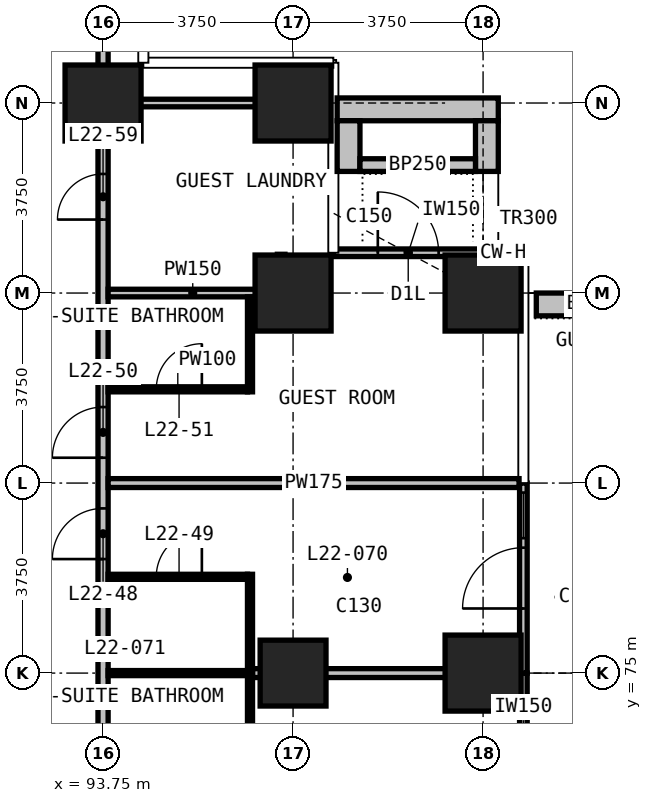
"""IFC4 building model, lengths in metres.
Left out: names, types, materials, properties, quantities, classifications, styles, units other than length and angle.
Written with IfcOpenShell. Run it as: python <this file> out.ifc"""

import sys

from ifc_helpers import new_model, si_unit, direction, frame, frame_2d, origin, origin_2d, place, context, subcontext, project, spatial, rectangle, extrude, element, fill, save


model = new_model("IFC4")
c1 = context("Model", 3, precision=1e-05, world=origin(), true_north=direction((0.0, 1.0)))
c2 = subcontext(c1, "Body", "Model", "MODEL_VIEW")
j1 = project(units=[si_unit("LENGTHUNIT", "METRE"), si_unit("PLANEANGLEUNIT", "RADIAN")], contexts=[c1])
p1 = place(None, origin())
s1 = spatial("IfcSite", under=j1, at=p1, CompositionType="ELEMENT")
p2 = place(p1, origin())
s2 = spatial("IfcBuilding", under=s1, at=p2, CompositionType="ELEMENT")
p3 = place(p2, frame((0.0, 0.0, 92.3)))
s3 = spatial("IfcBuildingStorey", under=s2, at=p3, CompositionType="ELEMENT", Elevation=92.3)
p4 = place(p3, frame((93.75, 86.25, 0.0), z_axis=(0.0, 0.0, 1.0), x_axis=(1.0, 0.0, 0.0)))
e1 = element("IfcColumn", 1, at=p4, inside=s3, PredefinedType="COLUMN", context=c2, shape_type="SweptSolid", body=[
    extrude(rectangle(XDim=1.5, YDim=1.5, at=origin_2d()), origin(), (0.0, 0.0, 1.0), 3.3),
])
p5 = place(p3, frame((97.5, 75.0, 0.0), z_axis=(0.0, 0.0, 1.0), x_axis=(1.0, 0.0, 0.0)))
e2 = element("IfcColumn", 2, at=p5, inside=s3, PredefinedType="COLUMN", context=c2, shape_type="SweptSolid", body=[
    extrude(rectangle(XDim=1.3, YDim=1.3, at=origin_2d()), origin(), (0.0, 0.0, 1.0), 3.3),
])
for number, where, z_axis, x_axis in (
    (3, (97.5, 82.5, 0.0), (0.0, 0.0, 1.0), (1.0, 0.0, 0.0)),
    (4, (97.5, 86.25, 0.0), (0.0, 0.0, 1.0), (1.0, 0.0, 0.0)),
    (5, (101.25, 75.0, 0.0), (0.0, 0.0, 1.0), (1.0, 0.0, 0.0)),
    (6, (101.25, 82.5, 0.0), (0.0, 0.0, 1.0), (1.0, 0.0, 0.0)),
):
    element("IfcColumn", number, at=place(p3, frame(where, z_axis=z_axis, x_axis=x_axis)), inside=s3, PredefinedType="COLUMN", context=c2, shape_type="SweptSolid", body=[
        extrude(rectangle(XDim=1.5, YDim=1.5, at=origin_2d()), origin(), (0.0, 0.0, 1.0), 3.3),
    ])
p6 = place(p3, frame((102.045, 71.25, 0.0), z_axis=(0.0, 0.0, 1.0), x_axis=(0.0, 1.0, 0.0)))
e7 = element("IfcWall", 7, at=p6, inside=s3, PredefinedType="SOLIDWALL", context=c2, shape_type="SweptSolid", body=[
    extrude(rectangle(XDim=3.75, YDim=0.15, at=frame_2d((1.875, 0.0))), origin(), (0.0, 0.0, 1.0), 3.0),
])
p7 = place(p6, frame((0.188, 0.0, 0.1)))
e8 = element("IfcOpeningElement", 8, at=p7, cuts=e7, PredefinedType="OPENING", context=c2, shape_type="SweptSolid", body=[
    extrude(rectangle(XDim=0.9, YDim=2.4, at=frame_2d((0.45, 1.2))), frame((0.0, 0.085, 0.0), z_axis=(0.0, -1.0, 0.0), x_axis=(1.0, 0.0, 0.0)), (0.0, 0.0, 1.0), 0.17),
])
p8 = place(p6, frame((1.275, 0.0, 0.0)))
e9 = element("IfcOpeningElement", 9, at=p8, cuts=e7, PredefinedType="OPENING", context=c2, shape_type="SweptSolid", body=[
    extrude(rectangle(XDim=1.2, YDim=2.4, at=frame_2d((0.6, 1.2))), frame((0.0, 0.085, 0.0), z_axis=(0.0, -1.0, 0.0), x_axis=(1.0, 0.0, 0.0)), (0.0, 0.0, 1.0), 0.17),
])
p9 = place(p3, frame((102.045, 75.0, 0.0), z_axis=(0.0, 0.0, 1.0), x_axis=(0.0, 1.0, 0.0)))
e10 = element("IfcWall", 10, at=p9, inside=s3, PredefinedType="SOLIDWALL", context=c2, shape_type="SweptSolid", body=[
    extrude(rectangle(XDim=3.75, YDim=0.15, at=frame_2d((1.875, 0.0))), origin(), (0.0, 0.0, 1.0), 3.0),
])
p10 = place(p9, frame((1.275, 0.0, 0.0)))
e11 = element("IfcOpeningElement", 11, at=p10, cuts=e10, PredefinedType="OPENING", context=c2, shape_type="SweptSolid", body=[
    extrude(rectangle(XDim=1.2, YDim=2.4, at=frame_2d((0.6, 1.2))), frame((0.0, 0.085, 0.0), z_axis=(0.0, -1.0, 0.0), x_axis=(1.0, 0.0, 0.0)), (0.0, 0.0, 1.0), 0.17),
])
p11 = place(p9, frame((2.663, 0.0, 0.1)))
e12 = element("IfcOpeningElement", 12, at=p11, cuts=e10, PredefinedType="OPENING", context=c2, shape_type="SweptSolid", body=[
    extrude(rectangle(XDim=0.9, YDim=2.4, at=frame_2d((0.45, 1.2))), frame((0.0, 0.085, 0.0), z_axis=(0.0, -1.0, 0.0), x_axis=(1.0, 0.0, 0.0)), (0.0, 0.0, 1.0), 0.17),
])
p12 = place(p3, frame((98.295, 83.295, 0.0), z_axis=(0.0, 0.0, 1.0), x_axis=(1.0, 0.0, 0.0)))
e13 = element("IfcWall", 13, at=p12, inside=s3, PredefinedType="SOLIDWALL", context=c2, shape_type="SweptSolid", body=[
    extrude(rectangle(XDim=2.955, YDim=0.15, at=frame_2d((1.478, 0.0))), origin(), (0.0, 0.0, 1.0), 3.0),
])
p13 = place(p12, frame((0.877, 0.0, 0.0)))
e14 = element("IfcOpeningElement", 14, at=p13, cuts=e13, PredefinedType="OPENING", context=c2, shape_type="SweptSolid", body=[
    extrude(rectangle(XDim=1.2, YDim=2.0, at=frame_2d((0.6, 1.0))), frame((0.0, 0.085, 0.0), z_axis=(0.0, -1.0, 0.0), x_axis=(1.0, 0.0, 0.0)), (0.0, 0.0, 1.0), 0.17),
])
p14 = place(p3, frame((102.3, 82.275, 0.0), z_axis=(0.0, 0.0, 1.0), x_axis=(1.0, 0.0, 0.0)))
e15 = element("IfcWall", 15, at=p14, inside=s3, PredefinedType="USERDEFINED", context=c2, shape_type="SweptSolid", body=[
    extrude(rectangle(XDim=2.35, YDim=0.45, at=frame_2d((1.175, 0.0))), origin(), (0.0, 0.0, 1.0), 1.1),
])
p15 = place(p3, frame((98.37, 86.125, 0.0), z_axis=(0.0, 0.0, 1.0), x_axis=(1.0, 0.0, 0.0)))
e16 = element("IfcWall", 16, at=p15, inside=s3, PredefinedType="USERDEFINED", context=c2, shape_type="SweptSolid", body=[
    extrude(rectangle(XDim=3.18, YDim=0.45, at=frame_2d((1.59, 0.0))), origin(), (0.0, 0.0, 1.0), 1.1),
])
for number, where, z_axis, x_axis in (
    (17, (98.595, 84.9, 0.0), (0.0, 0.0, 1.0), (0.0, 1.0, 0.0)),
    (18, (101.325, 84.9, 0.0), (0.0, 0.0, 1.0), (0.0, 1.0, 0.0)),
):
    element("IfcWall", number, at=place(p3, frame(where, z_axis=z_axis, x_axis=x_axis)), inside=s3, PredefinedType="USERDEFINED", context=c2, shape_type="SweptSolid", body=[
        extrude(rectangle(XDim=1.0, YDim=0.45, at=frame_2d((0.5, 0.0))), origin(), (0.0, 0.0, 1.0), 1.1),
    ])
p16 = place(p3, frame((98.82, 85.025, 0.0), z_axis=(0.0, 0.0, 1.0), x_axis=(1.0, 0.0, 0.0)))
e19 = element("IfcWall", 19, at=p16, inside=s3, PredefinedType="USERDEFINED", context=c2, shape_type="SweptSolid", body=[
    extrude(rectangle(XDim=2.28, YDim=0.25, at=frame_2d((1.14, 0.0))), origin(), (0.0, 0.0, 1.0), 1.0),
])
p17 = place(p3, frame((93.75, 52.4, 0.0), z_axis=(0.0, 0.0, 1.0), x_axis=(0.0, 1.0, 0.0)))
e20 = element("IfcWall", 20, at=p17, inside=s3, PredefinedType="PARTITIONING", context=c2, shape_type="SweptSolid", body=[
    extrude(rectangle(XDim=33.925, YDim=0.2, at=frame_2d((16.962, 0.0))), origin(), (0.0, 0.0, 1.0), 3.0),
])
p18 = place(p17, frame((2.35, 0.0, 0.0)))
e21 = element("IfcOpeningElement", 21, at=p18, cuts=e20, PredefinedType="OPENING", context=c2, shape_type="SweptSolid", body=[
    extrude(rectangle(XDim=1.0, YDim=2.2, at=frame_2d((0.5, 1.1))), frame((0.0, 0.11, 0.0), z_axis=(0.0, -1.0, 0.0), x_axis=(1.0, 0.0, 0.0)), (0.0, 0.0, 1.0), 0.22),
])
p19 = place(p17, frame((4.35, 0.0, 0.0)))
e22 = element("IfcOpeningElement", 22, at=p19, cuts=e20, PredefinedType="OPENING", context=c2, shape_type="SweptSolid", body=[
    extrude(rectangle(XDim=1.0, YDim=2.2, at=frame_2d((0.5, 1.1))), frame((0.0, 0.11, 0.0), z_axis=(0.0, -1.0, 0.0), x_axis=(1.0, 0.0, 0.0)), (0.0, 0.0, 1.0), 0.22),
])
p20 = place(p17, frame((9.85, 0.0, 0.0)))
e23 = element("IfcOpeningElement", 23, at=p20, cuts=e20, PredefinedType="OPENING", context=c2, shape_type="SweptSolid", body=[
    extrude(rectangle(XDim=1.0, YDim=2.2, at=frame_2d((0.5, 1.1))), frame((0.0, 0.11, 0.0), z_axis=(0.0, -1.0, 0.0), x_axis=(1.0, 0.0, 0.0)), (0.0, 0.0, 1.0), 0.22),
])
p21 = place(p17, frame((11.85, 0.0, 0.0)))
e24 = element("IfcOpeningElement", 24, at=p21, cuts=e20, PredefinedType="OPENING", context=c2, shape_type="SweptSolid", body=[
    extrude(rectangle(XDim=1.0, YDim=2.2, at=frame_2d((0.5, 1.1))), frame((0.0, 0.11, 0.0), z_axis=(0.0, -1.0, 0.0), x_axis=(1.0, 0.0, 0.0)), (0.0, 0.0, 1.0), 0.22),
])
p22 = place(p17, frame((17.35, 0.0, 0.0)))
e25 = element("IfcOpeningElement", 25, at=p22, cuts=e20, PredefinedType="OPENING", context=c2, shape_type="SweptSolid", body=[
    extrude(rectangle(XDim=1.0, YDim=2.2, at=frame_2d((0.5, 1.1))), frame((0.0, 0.11, 0.0), z_axis=(0.0, -1.0, 0.0), x_axis=(1.0, 0.0, 0.0)), (0.0, 0.0, 1.0), 0.22),
])
p23 = place(p17, frame((19.35, 0.0, 0.0)))
e26 = element("IfcOpeningElement", 26, at=p23, cuts=e20, PredefinedType="OPENING", context=c2, shape_type="SweptSolid", body=[
    extrude(rectangle(XDim=1.0, YDim=2.2, at=frame_2d((0.5, 1.1))), frame((0.0, 0.11, 0.0), z_axis=(0.0, -1.0, 0.0), x_axis=(1.0, 0.0, 0.0)), (0.0, 0.0, 1.0), 0.22),
])
p24 = place(p17, frame((24.85, 0.0, 0.0)))
e27 = element("IfcOpeningElement", 27, at=p24, cuts=e20, PredefinedType="OPENING", context=c2, shape_type="SweptSolid", body=[
    extrude(rectangle(XDim=1.0, YDim=2.2, at=frame_2d((0.5, 1.1))), frame((0.0, 0.11, 0.0), z_axis=(0.0, -1.0, 0.0), x_axis=(1.0, 0.0, 0.0)), (0.0, 0.0, 1.0), 0.22),
])
p25 = place(p17, frame((26.85, 0.0, 0.0)))
e28 = element("IfcOpeningElement", 28, at=p25, cuts=e20, PredefinedType="OPENING", context=c2, shape_type="SweptSolid", body=[
    extrude(rectangle(XDim=1.0, YDim=2.2, at=frame_2d((0.5, 1.1))), frame((0.0, 0.11, 0.0), z_axis=(0.0, -1.0, 0.0), x_axis=(1.0, 0.0, 0.0)), (0.0, 0.0, 1.0), 0.22),
])
p26 = place(p17, frame((31.55, 0.0, 0.0)))
e29 = element("IfcOpeningElement", 29, at=p26, cuts=e20, PredefinedType="OPENING", context=c2, shape_type="SweptSolid", body=[
    extrude(rectangle(XDim=0.9, YDim=2.2, at=frame_2d((0.45, 1.1))), frame((0.0, 0.11, 0.0), z_axis=(0.0, -1.0, 0.0), x_axis=(1.0, 0.0, 0.0)), (0.0, 0.0, 1.0), 0.22),
])
p27 = place(p3, frame((93.75, 86.28, 0.0), z_axis=(0.0, 0.0, 1.0), x_axis=(0.0, 1.0, 0.0)))
e30 = element("IfcWall", 30, at=p27, inside=s3, PredefinedType="PARTITIONING", context=c2, shape_type="SweptSolid", body=[
    extrude(rectangle(XDim=4.365, YDim=0.2, at=frame_2d((2.183, 0.0))), origin(), (0.0, 0.0, 1.0), 3.0),
])
p28 = place(p3, frame((96.7, 75.0, 0.0), z_axis=(0.0, 0.0, 1.0), x_axis=(1.0, 0.0, 0.0)))
e31 = element("IfcWall", 31, at=p28, inside=s3, PredefinedType="PARTITIONING", context=c2, shape_type="SweptSolid", body=[
    extrude(rectangle(XDim=5.26, YDim=0.175, at=frame_2d((2.63, 0.0))), origin(), (0.0, 0.0, 1.0), 3.0),
])
p29 = place(p3, frame((93.85, 78.75, 0.0), z_axis=(0.0, 0.0, 1.0), x_axis=(1.0, 0.0, 0.0)))
e32 = element("IfcWall", 32, at=p29, inside=s3, PredefinedType="PARTITIONING", context=c2, shape_type="SweptSolid", body=[
    extrude(rectangle(XDim=8.11, YDim=0.175, at=frame_2d((4.055, 0.0))), origin(), (0.0, 0.0, 1.0), 3.0),
])
p30 = place(p3, frame((93.85, 82.5, 0.0), z_axis=(0.0, 0.0, 1.0), x_axis=(1.0, 0.0, 0.0)))
e33 = element("IfcWall", 33, at=p30, inside=s3, PredefinedType="PARTITIONING", context=c2, shape_type="SweptSolid", body=[
    extrude(rectangle(XDim=3.34, YDim=0.15, at=frame_2d((1.67, 0.0))), origin(), (0.0, 0.0, 1.0), 3.0),
])
p31 = place(p3, frame((93.85, 86.25, 0.0), z_axis=(0.0, 0.0, 1.0), x_axis=(1.0, 0.0, 0.0)))
e34 = element("IfcWall", 34, at=p31, inside=s3, PredefinedType="PARTITIONING", context=c2, shape_type="SweptSolid", body=[
    extrude(rectangle(XDim=4.295, YDim=0.15, at=frame_2d((2.147, 0.0))), origin(), (0.0, 0.0, 1.0), 3.0),
])
p32 = place(p3, frame((97.265, 82.425, 0.0), z_axis=(0.0, 0.0, 1.0), x_axis=(0.0, 1.0, 0.0)))
e35 = element("IfcWall", 35, at=p32, inside=s3, PredefinedType="PARTITIONING", context=c2, shape_type="SweptSolid", body=[
    extrude(rectangle(XDim=0.84, YDim=0.15, at=frame_2d((0.42, 0.0))), origin(), (0.0, 0.0, 1.0), 3.0),
])
p33 = place(p3, frame((93.85, 75.0, 0.0), z_axis=(0.0, 0.0, 1.0), x_axis=(1.0, 0.0, 0.0)))
e36 = element("IfcWall", 36, at=p33, inside=s3, PredefinedType="PARTITIONING", context=c2, shape_type="SweptSolid", body=[
    extrude(rectangle(XDim=2.75, YDim=0.1, at=frame_2d((1.375, 0.0))), origin(), (0.0, 0.0, 1.0), 3.0),
])
p34 = place(p3, frame((93.85, 76.9, 0.0), z_axis=(0.0, 0.0, 1.0), x_axis=(1.0, 0.0, 0.0)))
e37 = element("IfcWall", 37, at=p34, inside=s3, PredefinedType="PARTITIONING", context=c2, shape_type="SweptSolid", body=[
    extrude(rectangle(XDim=2.75, YDim=0.1, at=frame_2d((1.375, 0.0))), origin(), (0.0, 0.0, 1.0), 3.0),
])
p35 = place(p34, frame((0.95, 0.0, 0.0)))
e38 = element("IfcOpeningElement", 38, at=p35, cuts=e37, PredefinedType="OPENING", context=c2, shape_type="SweptSolid", body=[
    extrude(rectangle(XDim=0.9, YDim=2.2, at=frame_2d((0.45, 1.1))), frame((0.0, 0.06, 0.0), z_axis=(0.0, -1.0, 0.0), x_axis=(1.0, 0.0, 0.0)), (0.0, 0.0, 1.0), 0.12),
])
p36 = place(p3, frame((93.85, 80.6, 0.0), z_axis=(0.0, 0.0, 1.0), x_axis=(1.0, 0.0, 0.0)))
e39 = element("IfcWall", 39, at=p36, inside=s3, PredefinedType="PARTITIONING", context=c2, shape_type="SweptSolid", body=[
    extrude(rectangle(XDim=2.75, YDim=0.1, at=frame_2d((1.375, 0.0))), origin(), (0.0, 0.0, 1.0), 3.0),
])
p37 = place(p36, frame((0.95, 0.0, 0.0)))
e40 = element("IfcOpeningElement", 40, at=p37, cuts=e39, PredefinedType="OPENING", context=c2, shape_type="SweptSolid", body=[
    extrude(rectangle(XDim=0.9, YDim=2.2, at=frame_2d((0.45, 1.1))), frame((0.0, 0.06, 0.0), z_axis=(0.0, -1.0, 0.0), x_axis=(1.0, 0.0, 0.0)), (0.0, 0.0, 1.0), 0.12),
])
p38 = place(p3, frame((96.65, 73.05, 0.0), z_axis=(0.0, 0.0, 1.0), x_axis=(0.0, 1.0, 0.0)))
e41 = element("IfcWall", 41, at=p38, inside=s3, PredefinedType="PARTITIONING", context=c2, shape_type="SweptSolid", body=[
    extrude(rectangle(XDim=3.9, YDim=0.1, at=frame_2d((1.95, 0.0))), origin(), (0.0, 0.0, 1.0), 3.0),
])
p39 = place(p3, frame((96.65, 80.55, 0.0), z_axis=(0.0, 0.0, 1.0), x_axis=(0.0, 1.0, 0.0)))
e42 = element("IfcWall", 42, at=p39, inside=s3, PredefinedType="PARTITIONING", context=c2, shape_type="SweptSolid", body=[
    extrude(rectangle(XDim=1.875, YDim=0.1, at=frame_2d((0.938, 0.0))), origin(), (0.0, 0.0, 1.0), 3.0),
])
p40 = place(p10, origin())
e43 = element("IfcDoor", 43, at=p40, inside=s3, OperationType="SINGLE_SWING_LEFT", PredefinedType="DOOR", context=c2, shape_type="SweptSolid", body=[
    extrude(rectangle(XDim=1.2, YDim=2.4, at=frame_2d((0.6, 1.2))), frame((0.0, 0.025, 0.0), z_axis=(0.0, -1.0, 0.0), x_axis=(1.0, 0.0, 0.0)), (0.0, 0.0, 1.0), 0.05),
])
fill(e11, e43)
p41 = place(p11, origin())
e44 = element("IfcWindow", 44, at=p41, inside=s3, PartitioningType="SINGLE_PANEL", PredefinedType="WINDOW", context=c2, shape_type="SweptSolid", body=[
    extrude(rectangle(XDim=0.9, YDim=2.4, at=frame_2d((0.45, 1.2))), frame((0.0, 0.03, 0.0), z_axis=(0.0, -1.0, 0.0), x_axis=(1.0, 0.0, 0.0)), (0.0, 0.0, 1.0), 0.06),
])
fill(e12, e44)
p42 = place(p13, origin())
e45 = element("IfcDoor", 45, at=p42, inside=s3, OperationType="SINGLE_SWING_LEFT", PredefinedType="DOOR", context=c2, shape_type="SweptSolid", body=[
    extrude(rectangle(XDim=1.2, YDim=2.0, at=frame_2d((0.6, 1.0))), frame((0.0, 0.025, 0.0), z_axis=(0.0, -1.0, 0.0), x_axis=(1.0, 0.0, 0.0)), (0.0, 0.0, 1.0), 0.05),
])
fill(e14, e45)
p43 = place(p24, origin())
e46 = element("IfcDoor", 46, at=p43, inside=s3, OperationType="SINGLE_SWING_LEFT", PredefinedType="DOOR", context=c2, shape_type="SweptSolid", body=[
    extrude(rectangle(XDim=1.0, YDim=2.2, at=frame_2d((0.5, 1.1))), frame((0.0, 0.025, 0.0), z_axis=(0.0, -1.0, 0.0), x_axis=(1.0, 0.0, 0.0)), (0.0, 0.0, 1.0), 0.05),
])
fill(e27, e46)
p44 = place(p35, origin())
e47 = element("IfcDoor", 47, at=p44, inside=s3, OperationType="SINGLE_SWING_RIGHT", PredefinedType="DOOR", context=c2, shape_type="SweptSolid", body=[
    extrude(rectangle(XDim=0.9, YDim=2.2, at=frame_2d((0.45, 1.1))), frame((0.0, 0.025, 0.0), z_axis=(0.0, -1.0, 0.0), x_axis=(1.0, 0.0, 0.0)), (0.0, 0.0, 1.0), 0.05),
])
fill(e38, e47)
p45 = place(p25, origin())
e48 = element("IfcDoor", 48, at=p45, inside=s3, OperationType="SINGLE_SWING_LEFT", PredefinedType="DOOR", context=c2, shape_type="SweptSolid", body=[
    extrude(rectangle(XDim=1.0, YDim=2.2, at=frame_2d((0.5, 1.1))), frame((0.0, 0.025, 0.0), z_axis=(0.0, -1.0, 0.0), x_axis=(1.0, 0.0, 0.0)), (0.0, 0.0, 1.0), 0.05),
])
fill(e28, e48)
p46 = place(p37, origin())
e49 = element("IfcDoor", 49, at=p46, inside=s3, OperationType="SINGLE_SWING_RIGHT", PredefinedType="DOOR", context=c2, shape_type="SweptSolid", body=[
    extrude(rectangle(XDim=0.9, YDim=2.2, at=frame_2d((0.45, 1.1))), frame((0.0, 0.025, 0.0), z_axis=(0.0, -1.0, 0.0), x_axis=(1.0, 0.0, 0.0)), (0.0, 0.0, 1.0), 0.05),
])
fill(e40, e49)
p47 = place(p26, origin())
e50 = element("IfcDoor", 50, at=p47, inside=s3, OperationType="SINGLE_SWING_LEFT", PredefinedType="DOOR", context=c2, shape_type="SweptSolid", body=[
    extrude(rectangle(XDim=0.9, YDim=2.2, at=frame_2d((0.45, 1.1))), frame((0.0, 0.025, 0.0), z_axis=(0.0, -1.0, 0.0), x_axis=(1.0, 0.0, 0.0)), (0.0, 0.0, 1.0), 0.05),
])
fill(e29, e50)
save(model, sys.argv[1])
